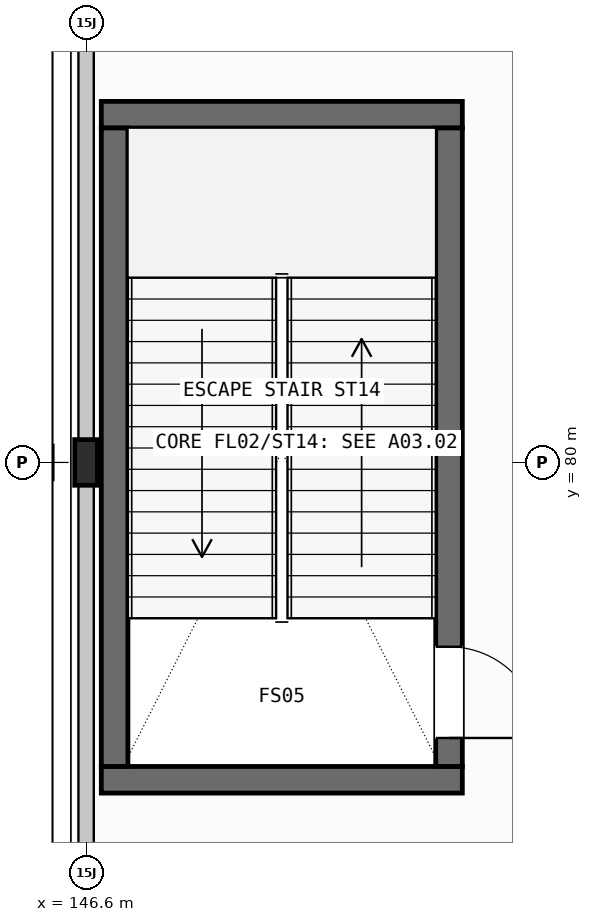
"""IFC4 building model, lengths in metres.
Left out: names, types, materials, properties, quantities, classifications, styles, units other than length and angle.
Written with IfcOpenShell. Run it as: python <this file> out.ifc"""

import sys

from ifc_helpers import new_model, si_unit, direction, frame, frame_2d, origin, origin_2d, place, context, subcontext, project, spatial, rectangle, i_section, extrude, element, fill, save


model = new_model("IFC4")
c1 = context("Model", 3, precision=1e-05, world=origin(), true_north=direction((0.0, 1.0)))
c2 = subcontext(c1, "Body", "Model", "MODEL_VIEW")
j1 = project(units=[si_unit("LENGTHUNIT", "METRE"), si_unit("PLANEANGLEUNIT", "RADIAN")], contexts=[c1])
p1 = place(None, origin())
s1 = spatial("IfcSite", under=j1, at=p1, CompositionType="ELEMENT")
p2 = place(p1, origin())
s2 = spatial("IfcBuilding", under=s1, at=p2, CompositionType="ELEMENT")
p3 = place(p2, origin())
s3 = spatial("IfcBuildingStorey", under=s2, at=p3, CompositionType="ELEMENT", Elevation=0.0)
p4 = place(p3, frame((146.0, 80.0, 0.0), z_axis=(0.0, 0.0, 1.0), x_axis=(1.0, 0.0, 0.0)))
e1 = element("IfcColumn", 1, at=p4, inside=s3, PredefinedType="COLUMN", context=c2, shape_type="SweptSolid", body=[
    extrude(i_section(OverallWidth=0.307, OverallDepth=0.432, WebThickness=0.021, FlangeThickness=0.04, FilletRadius=0.027, at=origin_2d()), origin(), (0.0, 0.0, 1.0), 6.0),
])
p5 = place(p3, frame((146.6, 80.0, 0.0), z_axis=(0.0, 0.0, 1.0), x_axis=(1.0, 0.0, 0.0)))
e2 = element("IfcColumn", 2, at=p5, inside=s3, PredefinedType="COLUMN", context=c2, shape_type="SweptSolid", body=[
    extrude(i_section(OverallWidth=0.3, OverallDepth=0.6, WebThickness=0.015, FlangeThickness=0.03, FilletRadius=0.027, at=origin_2d()), origin(), (0.0, 0.0, 1.0), 6.0),
])
for number, where, z_axis, x_axis in (
    (3, (146.8, 75.825, 0.0), (0.0, 0.0, 1.0), (1.0, 0.0, 0.0)),
    (4, (146.8, 84.575, 0.0), (0.0, 0.0, 1.0), (1.0, 0.0, 0.0)),
):
    element("IfcWall", number, at=place(p3, frame(where, z_axis=z_axis, x_axis=x_axis)), inside=s3, PredefinedType="SHEAR", context=c2, shape_type="SweptSolid", body=[
        extrude(rectangle(XDim=4.75, YDim=0.35, at=frame_2d((2.375, 0.0))), origin(), (0.0, 0.0, 1.0), 6.0),
    ])
p6 = place(p3, frame((146.975, 76.0, 0.0), z_axis=(0.0, 0.0, 1.0), x_axis=(0.0, 1.0, 0.0)))
e5 = element("IfcWall", 5, at=p6, inside=s3, PredefinedType="SHEAR", context=c2, shape_type="SweptSolid", body=[
    extrude(rectangle(XDim=8.4, YDim=0.35, at=frame_2d((4.2, 0.0))), origin(), (0.0, 0.0, 1.0), 6.0),
])
p7 = place(p3, frame((151.375, 76.0, 0.0), z_axis=(0.0, 0.0, 1.0), x_axis=(0.0, 1.0, 0.0)))
e6 = element("IfcWall", 6, at=p7, inside=s3, PredefinedType="SHEAR", context=c2, shape_type="SweptSolid", body=[
    extrude(rectangle(XDim=8.4, YDim=0.35, at=frame_2d((4.2, 0.0))), origin(), (0.0, 0.0, 1.0), 6.0),
])
p8 = place(p7, frame((0.375, 0.0, 0.0)))
e7 = element("IfcOpeningElement", 7, at=p8, cuts=e6, PredefinedType="OPENING", context=c2, shape_type="SweptSolid", body=[
    extrude(rectangle(XDim=1.2, YDim=2.2, at=frame_2d((0.6, 1.1))), frame((0.0, 0.185, 0.0), z_axis=(0.0, -1.0, 0.0), x_axis=(1.0, 0.0, 0.0)), (0.0, 0.0, 1.0), 0.37),
])
p9 = place(p3, frame((146.0, 74.212, 0.0), z_axis=(0.0, 0.0, 1.0), x_axis=(0.0, 1.0, 0.0)))
e8 = element("IfcWall", 8, at=p9, inside=s3, PredefinedType="STANDARD", context=c2, shape_type="SweptSolid", body=[
    extrude(rectangle(XDim=5.576, YDim=0.312, at=frame_2d((2.788, 0.0))), origin(), (0.0, 0.0, 1.0), 5.0),
])
p10 = place(p3, frame((146.0, 80.212, 0.0), z_axis=(0.0, 0.0, 1.0), x_axis=(0.0, 1.0, 0.0)))
e9 = element("IfcWall", 9, at=p10, inside=s3, PredefinedType="STANDARD", context=c2, shape_type="SweptSolid", body=[
    extrude(rectangle(XDim=5.576, YDim=0.312, at=frame_2d((2.788, 0.0))), origin(), (0.0, 0.0, 1.0), 4.2),
])
for number, where, z_axis, x_axis in (
    (10, (146.6, 74.296, 0.0), (0.0, 0.0, 1.0), (0.0, 1.0, 0.0)),
    (11, (146.6, 80.296, 0.0), (0.0, 0.0, 1.0), (0.0, 1.0, 0.0)),
):
    element("IfcWall", number, at=place(p3, frame(where, z_axis=z_axis, x_axis=x_axis)), inside=s3, PredefinedType="STANDARD", context=c2, shape_type="SweptSolid", body=[
        extrude(rectangle(XDim=5.408, YDim=0.202, at=frame_2d((2.704, 0.0))), origin(), (0.0, 0.0, 1.0), 5.098),
    ])
p11 = place(p8, frame((1.2, 0.0, 0.0), z_axis=(0.0, 0.0, 1.0), x_axis=(-1.0, 0.0, 0.0)))
e12 = element("IfcDoor", 12, at=p11, inside=s3, OperationType="SINGLE_SWING_RIGHT", PredefinedType="DOOR", context=c2, shape_type="SweptSolid", body=[
    extrude(rectangle(XDim=1.2, YDim=2.2, at=frame_2d((0.6, 1.1))), frame((0.0, 0.025, 0.0), z_axis=(0.0, -1.0, 0.0), x_axis=(1.0, 0.0, 0.0)), (0.0, 0.0, 1.0), 0.05),
])
fill(e7, e12)
save(model, sys.argv[1])
